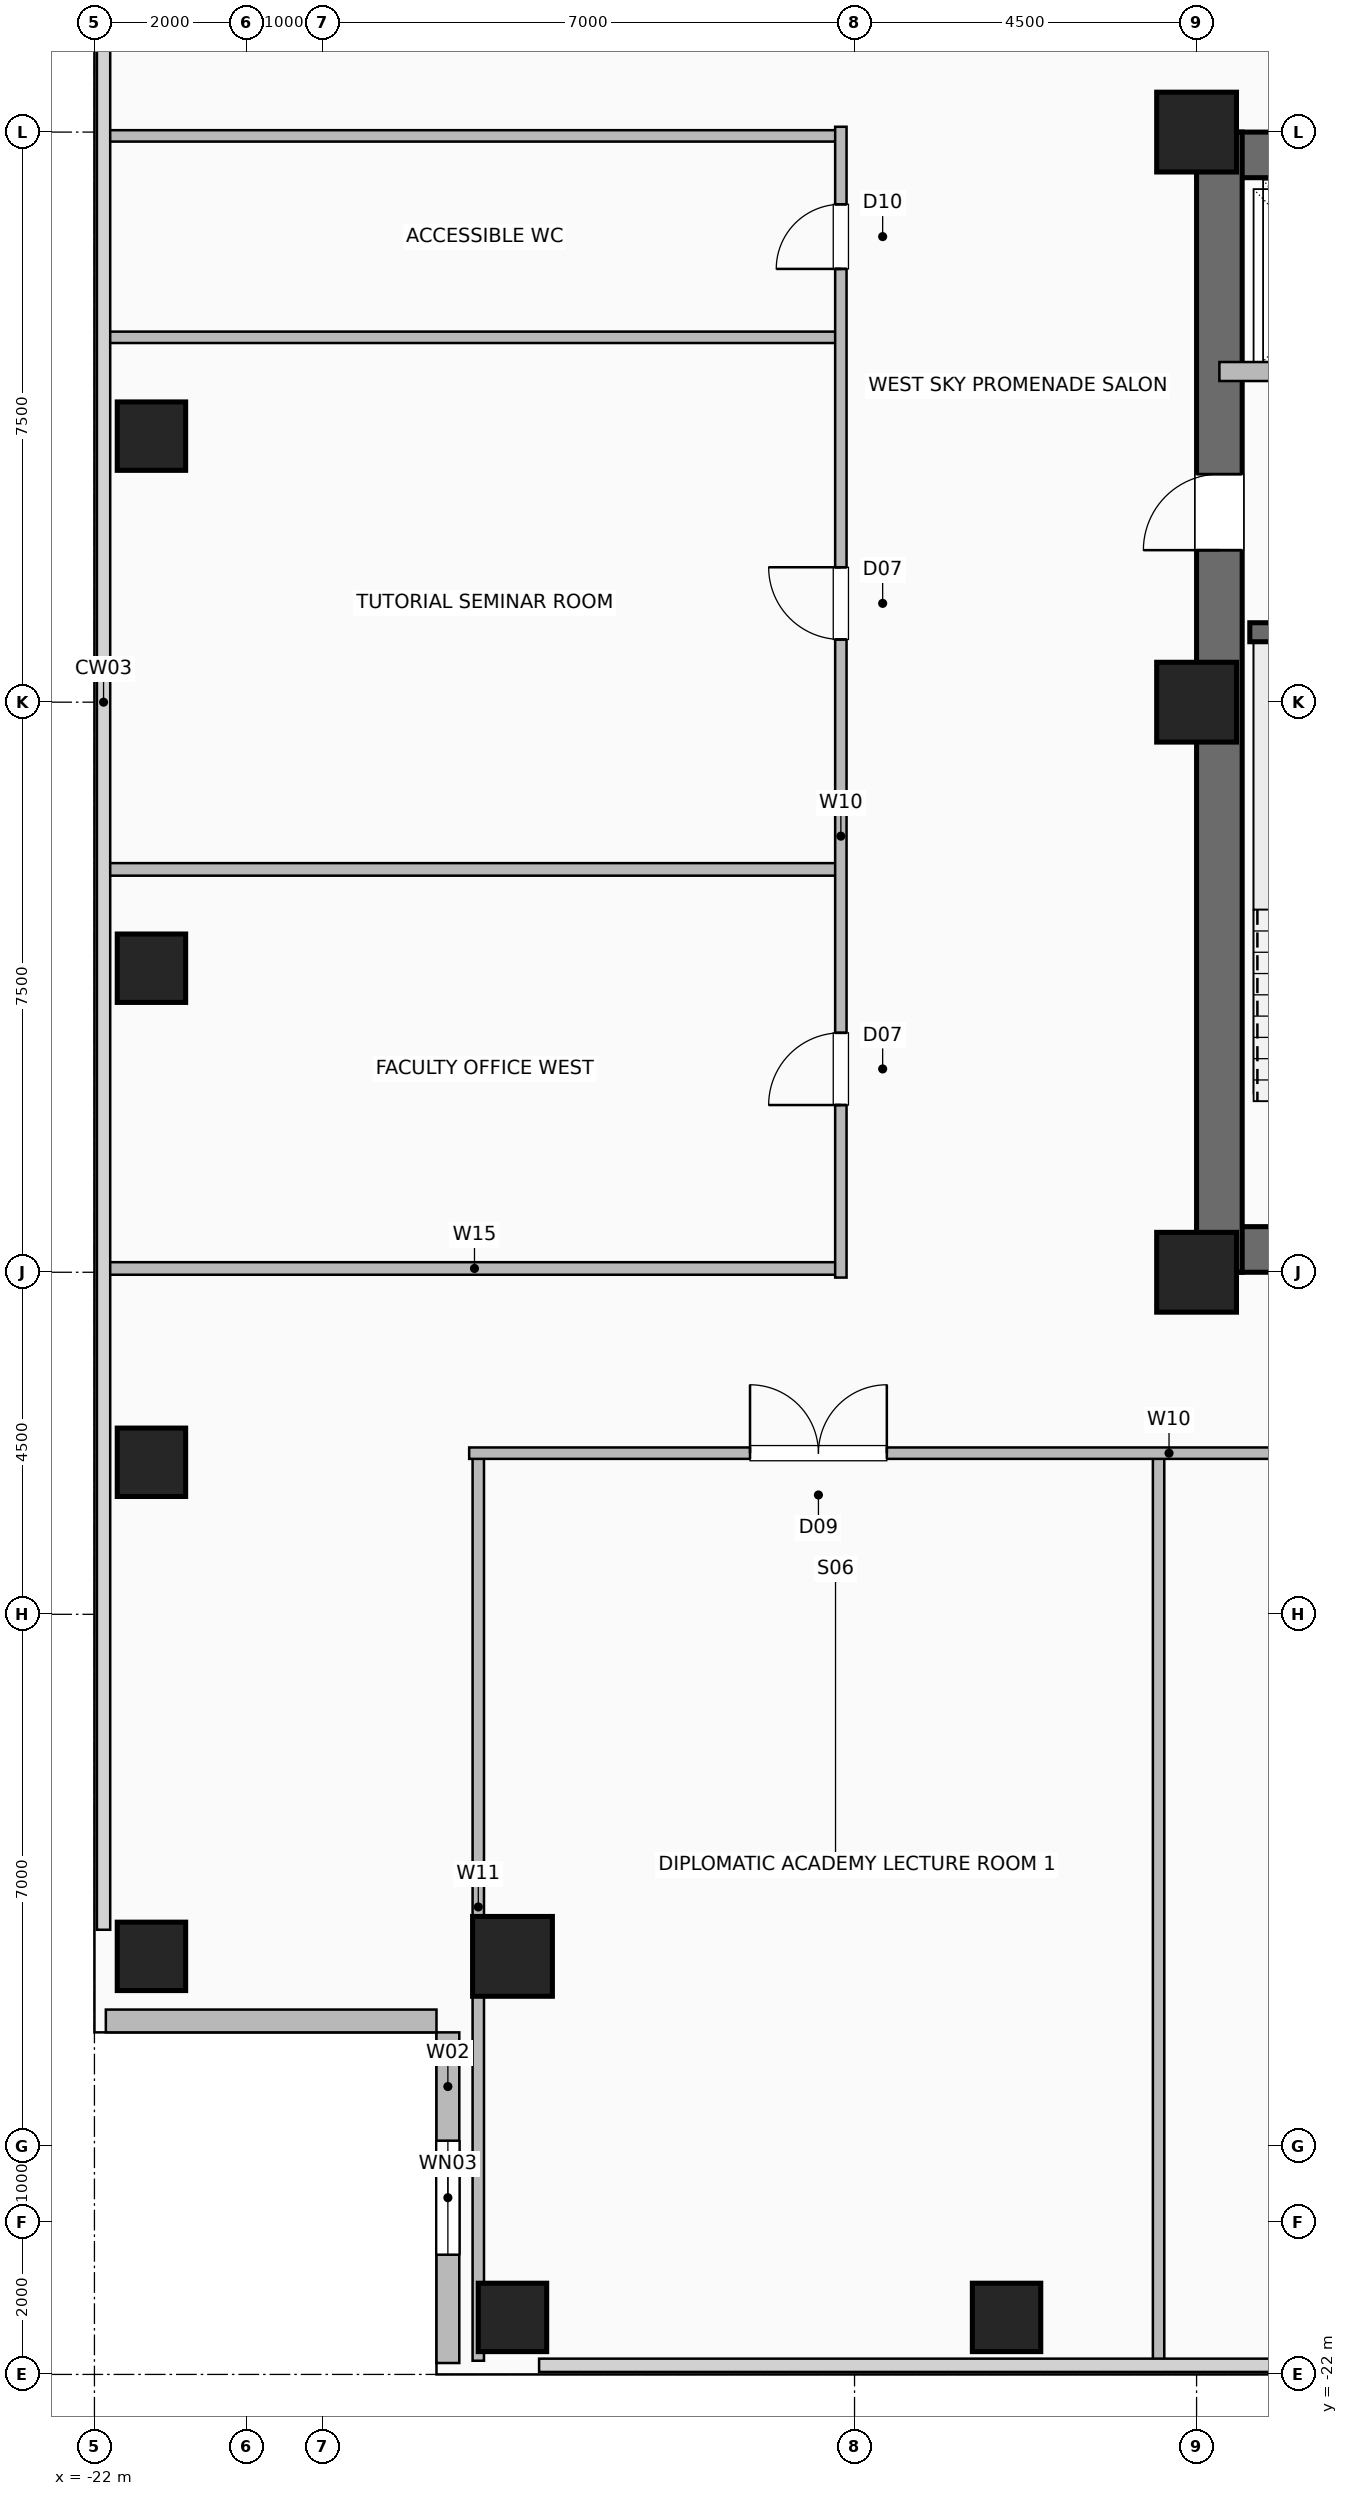
"""IFC4 building model, lengths in metres.
Left out: names, types, materials, properties, quantities, classifications, styles, units other than length and angle.
Written with IfcOpenShell. Run it as: python <this file> out.ifc"""

import sys

from ifc_helpers import new_model, si_unit, direction, frame, frame_2d, origin, origin_2d, place, context, subcontext, project, spatial, rectangle, hollow_rectangle, extrude, element, fill, save


model = new_model("IFC4")
c1 = context("Model", 3, precision=1e-05, world=origin(), true_north=direction((0.0, 1.0)))
c2 = subcontext(c1, "Body", "Model", "MODEL_VIEW")
j1 = project(units=[si_unit("LENGTHUNIT", "METRE"), si_unit("PLANEANGLEUNIT", "RADIAN")], contexts=[c1])
p1 = place(None, origin())
s1 = spatial("IfcSite", under=j1, at=p1, CompositionType="ELEMENT")
p2 = place(p1, origin())
s2 = spatial("IfcBuilding", under=s1, at=p2, CompositionType="ELEMENT")
p3 = place(p2, frame((0.0, 0.0, 130.0)))
s3 = spatial("IfcBuildingStorey", under=s2, at=p3, CompositionType="ELEMENT", Elevation=130.0)
for number, where, z_axis, x_axis in (
    (1, (-7.5, -7.5, 0.0), (0.0, 0.0, 1.0), (1.0, 0.0, 0.0)),
    (2, (-7.5, 7.5, 0.0), (0.0, 0.0, 1.0), (1.0, 0.0, 0.0)),
    (3, (-7.5, 0.0, 0.0), (0.0, 0.0, 1.0), (1.0, 0.0, 0.0)),
):
    element("IfcColumn", number, at=place(p3, frame(where, z_axis=z_axis, x_axis=x_axis)), inside=s3, PredefinedType="COLUMN", context=c2, shape_type="SweptSolid", body=[
        extrude(hollow_rectangle(XDim=1.05, YDim=1.05, WallThickness=0.05, at=origin_2d()), origin(), (0.0, 0.0, 1.0), 3.6),
    ])
for number, where, z_axis, x_axis in (
    (4, (-16.5, -21.25, 0.0), (0.0, 0.0, 1.0), (1.0, 0.0, 0.0)),
    (5, (-21.25, -16.5, 0.0), (0.0, 0.0, 1.0), (1.0, 0.0, 0.0)),
    (6, (-10.0, -21.25, 0.0), (0.0, 0.0, 1.0), (1.0, 0.0, 0.0)),
    (7, (-21.25, -10.0, 0.0), (0.0, 0.0, 1.0), (1.0, 0.0, 0.0)),
    (8, (-21.25, -3.5, 0.0), (0.0, 0.0, 1.0), (1.0, 0.0, 0.0)),
    (9, (-21.25, 3.5, 0.0), (0.0, 0.0, 1.0), (1.0, 0.0, 0.0)),
):
    element("IfcColumn", number, at=place(p3, frame(where, z_axis=z_axis, x_axis=x_axis)), inside=s3, PredefinedType="COLUMN", context=c2, shape_type="SweptSolid", body=[
        extrude(hollow_rectangle(XDim=0.9, YDim=0.9, WallThickness=0.045, at=origin_2d()), origin(), (0.0, 0.0, 1.0), 3.6),
    ])
p4 = place(p3, frame((-16.5, -16.5, 0.0), z_axis=(0.0, 0.0, 1.0), x_axis=(1.0, 0.0, 0.0)))
e10 = element("IfcColumn", 10, at=p4, inside=s3, PredefinedType="COLUMN", context=c2, shape_type="SweptSolid", body=[
    extrude(hollow_rectangle(XDim=1.05, YDim=1.05, WallThickness=0.05, at=origin_2d()), origin(), (0.0, 0.0, 1.0), 3.6),
])
p5 = place(p3, frame((-17.35, -21.85, 0.0), z_axis=(0.0, 0.0, 1.0), x_axis=(0.0, 1.0, 0.0)))
e11 = element("IfcWall", 11, at=p5, inside=s3, PredefinedType="SOLIDWALL", context=c2, shape_type="SweptSolid", body=[
    extrude(rectangle(XDim=4.35, YDim=0.3, at=frame_2d((2.175, 0.0))), origin(), (0.0, 0.0, 1.0), 3.36),
])
p6 = place(p5, frame((1.425, 0.0, 0.9)))
e12 = element("IfcOpeningElement", 12, at=p6, cuts=e11, PredefinedType="OPENING", context=c2, shape_type="SweptSolid", body=[
    extrude(rectangle(XDim=1.5, YDim=1.8, at=frame_2d((0.75, 0.9))), frame((0.0, 0.16, 0.0), z_axis=(0.0, -1.0, 0.0), x_axis=(1.0, 0.0, 0.0)), (0.0, 0.0, 1.0), 0.32),
])
p7 = place(p3, frame((-21.85, -17.35, 0.0), z_axis=(0.0, 0.0, 1.0), x_axis=(1.0, 0.0, 0.0)))
e13 = element("IfcWall", 13, at=p7, inside=s3, PredefinedType="SOLIDWALL", context=c2, shape_type="SweptSolid", body=[
    extrude(rectangle(XDim=4.35, YDim=0.3, at=frame_2d((2.175, 0.0))), origin(), (0.0, 0.0, 1.0), 3.36),
])
p8 = place(p3, frame((-7.5, -7.2, 0.0), z_axis=(0.0, 0.0, 1.0), x_axis=(1.0, 0.0, 0.0)))
e14 = element("IfcWall", 14, at=p8, inside=s3, PredefinedType="SHEAR", context=c2, shape_type="SweptSolid", body=[
    extrude(rectangle(XDim=15.0, YDim=0.6, at=frame_2d((7.5, 0.0))), origin(), (0.0, 0.0, 1.0), 3.36),
])
p9 = place(p8, frame((1.55, 0.0, 0.0)))
e15 = element("IfcOpeningElement", 15, at=p9, cuts=e14, PredefinedType="OPENING", context=c2, shape_type="SweptSolid", body=[
    extrude(rectangle(XDim=1.05, YDim=2.08, at=frame_2d((0.525, 1.04))), frame((0.0, 0.31, 0.0), z_axis=(0.0, -1.0, 0.0), x_axis=(1.0, 0.0, 0.0)), (0.0, 0.0, 1.0), 0.62),
])
p10 = place(p8, frame((12.4, 0.0, 0.0)))
e16 = element("IfcOpeningElement", 16, at=p10, cuts=e14, PredefinedType="OPENING", context=c2, shape_type="SweptSolid", body=[
    extrude(rectangle(XDim=1.05, YDim=2.08, at=frame_2d((0.525, 1.04))), frame((0.0, 0.31, 0.0), z_axis=(0.0, -1.0, 0.0), x_axis=(1.0, 0.0, 0.0)), (0.0, 0.0, 1.0), 0.62),
])
p11 = place(p8, frame((4.95, 0.0, 0.0)))
e17 = element("IfcOpeningElement", 17, at=p11, cuts=e14, PredefinedType="OPENING", context=c2, shape_type="SweptSolid", body=[
    extrude(rectangle(XDim=1.0, YDim=2.08, at=frame_2d((0.5, 1.04))), frame((0.0, 0.31, 0.0), z_axis=(0.0, -1.0, 0.0), x_axis=(1.0, 0.0, 0.0)), (0.0, 0.0, 1.0), 0.62),
])
p12 = place(p8, frame((7.05, 0.0, 0.0)))
e18 = element("IfcOpeningElement", 18, at=p12, cuts=e14, PredefinedType="OPENING", context=c2, shape_type="SweptSolid", body=[
    extrude(rectangle(XDim=1.0, YDim=2.08, at=frame_2d((0.5, 1.04))), frame((0.0, 0.31, 0.0), z_axis=(0.0, -1.0, 0.0), x_axis=(1.0, 0.0, 0.0)), (0.0, 0.0, 1.0), 0.62),
])
p13 = place(p8, frame((9.15, 0.0, 0.0)))
e19 = element("IfcOpeningElement", 19, at=p13, cuts=e14, PredefinedType="OPENING", context=c2, shape_type="SweptSolid", body=[
    extrude(rectangle(XDim=1.0, YDim=2.08, at=frame_2d((0.5, 1.04))), frame((0.0, 0.31, 0.0), z_axis=(0.0, -1.0, 0.0), x_axis=(1.0, 0.0, 0.0)), (0.0, 0.0, 1.0), 0.62),
])
p14 = place(p3, frame((-7.5, 7.2, 0.0), z_axis=(0.0, 0.0, 1.0), x_axis=(1.0, 0.0, 0.0)))
e20 = element("IfcWall", 20, at=p14, inside=s3, PredefinedType="SHEAR", context=c2, shape_type="SweptSolid", body=[
    extrude(rectangle(XDim=15.0, YDim=0.6, at=frame_2d((7.5, 0.0))), origin(), (0.0, 0.0, 1.0), 3.36),
])
p15 = place(p3, frame((-7.2, -7.5, 0.0), z_axis=(0.0, 0.0, 1.0), x_axis=(0.0, 1.0, 0.0)))
e21 = element("IfcWall", 21, at=p15, inside=s3, PredefinedType="SHEAR", context=c2, shape_type="SweptSolid", body=[
    extrude(rectangle(XDim=15.0, YDim=0.6, at=frame_2d((7.5, 0.0))), origin(), (0.0, 0.0, 1.0), 3.36),
])
p16 = place(p15, frame((9.5, 0.0, 0.0)))
e22 = element("IfcOpeningElement", 22, at=p16, cuts=e21, PredefinedType="OPENING", context=c2, shape_type="SweptSolid", body=[
    extrude(rectangle(XDim=1.0, YDim=2.08, at=frame_2d((0.5, 1.04))), frame((0.0, 0.31, 0.0), z_axis=(0.0, -1.0, 0.0), x_axis=(1.0, 0.0, 0.0)), (0.0, 0.0, 1.0), 0.62),
])
p17 = place(p3, frame((-6.8, 0.92, 0.0), z_axis=(0.0, 0.0, 1.0), x_axis=(1.0, 0.0, 0.0)))
e23 = element("IfcWall", 23, at=p17, inside=s3, PredefinedType="SHEAR", context=c2, shape_type="SweptSolid", body=[
    extrude(rectangle(XDim=3.33, YDim=0.25, at=frame_2d((1.665, 0.0))), origin(), (0.0, 0.0, 1.0), 3.36),
])
p18 = place(p3, frame((-7.2, 4.35, 0.0), z_axis=(0.0, 0.0, 1.0), x_axis=(1.0, 0.0, 0.0)))
e24 = element("IfcWall", 24, at=p18, inside=s3, PredefinedType="SHEAR", context=c2, shape_type="SweptSolid", body=[
    extrude(rectangle(XDim=2.7, YDim=0.25, at=frame_2d((1.35, 0.0))), origin(), (0.0, 0.0, 1.0), 3.36),
])
p19 = place(p18, frame((0.75, 0.0, 0.0)))
e25 = element("IfcOpeningElement", 25, at=p19, cuts=e24, PredefinedType="OPENING", context=c2, shape_type="SweptSolid", body=[
    extrude(rectangle(XDim=1.2, YDim=2.2, at=frame_2d((0.6, 1.1))), frame((0.0, 0.135, 0.0), z_axis=(0.0, -1.0, 0.0), x_axis=(1.0, 0.0, 0.0)), (0.0, 0.0, 1.0), 0.27),
])
for number, where, z_axis, x_axis in (
    (26, (-16.95, -21.82, 0.0), (0.0, 0.0, 1.0), (0.0, 1.0, 0.0)),
    (27, (-8.0, -21.82, 0.0), (0.0, 0.0, 1.0), (0.0, 1.0, 0.0)),
):
    element("IfcWall", number, at=place(p3, frame(where, z_axis=z_axis, x_axis=x_axis)), inside=s3, PredefinedType="PARTITIONING", context=c2, shape_type="SweptSolid", body=[
        extrude(rectangle(XDim=11.94, YDim=0.15, at=frame_2d((5.97, 0.0))), origin(), (0.0, 0.0, 1.0), 3.36),
    ])
p20 = place(p3, frame((-17.07, -9.88, 0.0), z_axis=(0.0, 0.0, 1.0), x_axis=(1.0, 0.0, 0.0)))
e28 = element("IfcWall", 28, at=p20, inside=s3, PredefinedType="PARTITIONING", context=c2, shape_type="SweptSolid", body=[
    extrude(rectangle(XDim=34.14, YDim=0.15, at=frame_2d((17.07, 0.0))), origin(), (0.0, 0.0, 1.0), 3.36),
])
p21 = place(p20, frame((3.695, 0.0, 0.0)))
e29 = element("IfcOpeningElement", 29, at=p21, cuts=e28, PredefinedType="OPENING", context=c2, shape_type="SweptSolid", body=[
    extrude(rectangle(XDim=1.8, YDim=2.08, at=frame_2d((0.9, 1.04))), frame((0.0, 0.085, 0.0), z_axis=(0.0, -1.0, 0.0), x_axis=(1.0, 0.0, 0.0)), (0.0, 0.0, 1.0), 0.17),
])
p22 = place(p20, frame((12.92, 0.0, 0.0)))
e30 = element("IfcOpeningElement", 30, at=p22, cuts=e28, PredefinedType="OPENING", context=c2, shape_type="SweptSolid", body=[
    extrude(rectangle(XDim=1.8, YDim=2.08, at=frame_2d((0.9, 1.04))), frame((0.0, 0.085, 0.0), z_axis=(0.0, -1.0, 0.0), x_axis=(1.0, 0.0, 0.0)), (0.0, 0.0, 1.0), 0.17),
])
p23 = place(p20, frame((21.67, 0.0, 0.0)))
e31 = element("IfcOpeningElement", 31, at=p23, cuts=e28, PredefinedType="OPENING", context=c2, shape_type="SweptSolid", body=[
    extrude(rectangle(XDim=1.8, YDim=2.08, at=frame_2d((0.9, 1.04))), frame((0.0, 0.085, 0.0), z_axis=(0.0, -1.0, 0.0), x_axis=(1.0, 0.0, 0.0)), (0.0, 0.0, 1.0), 0.17),
])
p24 = place(p20, frame((29.82, 0.0, 0.0)))
e32 = element("IfcOpeningElement", 32, at=p24, cuts=e28, PredefinedType="OPENING", context=c2, shape_type="SweptSolid", body=[
    extrude(rectangle(XDim=0.95, YDim=2.06, at=frame_2d((0.475, 1.03))), frame((0.0, 0.085, 0.0), z_axis=(0.0, -1.0, 0.0), x_axis=(1.0, 0.0, 0.0)), (0.0, 0.0, 1.0), 0.17),
])
for number, where, z_axis, x_axis in (
    (33, (-21.82, -7.45, 0.0), (0.0, 0.0, 1.0), (1.0, 0.0, 0.0)),
    (34, (-21.82, -2.2, 0.0), (0.0, 0.0, 1.0), (1.0, 0.0, 0.0)),
):
    element("IfcWall", number, at=place(p3, frame(where, z_axis=z_axis, x_axis=x_axis)), inside=s3, PredefinedType="PLUMBINGWALL", context=c2, shape_type="SweptSolid", body=[
        extrude(rectangle(XDim=9.64, YDim=0.165, at=frame_2d((4.82, 0.0))), origin(), (0.0, 0.0, 1.0), 3.36),
    ])
p25 = place(p3, frame((-21.82, 4.8, 0.0), z_axis=(0.0, 0.0, 1.0), x_axis=(1.0, 0.0, 0.0)))
e35 = element("IfcWall", 35, at=p25, inside=s3, PredefinedType="PARTITIONING", context=c2, shape_type="SweptSolid", body=[
    extrude(rectangle(XDim=9.64, YDim=0.15, at=frame_2d((4.82, 0.0))), origin(), (0.0, 0.0, 1.0), 2.928),
])
p26 = place(p3, frame((-21.82, 7.45, 0.0), z_axis=(0.0, 0.0, 1.0), x_axis=(1.0, 0.0, 0.0)))
e36 = element("IfcWall", 36, at=p26, inside=s3, PredefinedType="PARTITIONING", context=c2, shape_type="SweptSolid", body=[
    extrude(rectangle(XDim=9.64, YDim=0.15, at=frame_2d((4.82, 0.0))), origin(), (0.0, 0.0, 1.0), 3.36),
])
p27 = place(p3, frame((-12.18, -7.57, 0.0), z_axis=(0.0, 0.0, 1.0), x_axis=(0.0, 1.0, 0.0)))
e37 = element("IfcWall", 37, at=p27, inside=s3, PredefinedType="PARTITIONING", context=c2, shape_type="SweptSolid", body=[
    extrude(rectangle(XDim=15.14, YDim=0.15, at=frame_2d((7.57, 0.0))), origin(), (0.0, 0.0, 1.0), 3.36),
])
p28 = place(p27, frame((2.27, 0.0, 0.0)))
e38 = element("IfcOpeningElement", 38, at=p28, cuts=e37, PredefinedType="OPENING", context=c2, shape_type="SweptSolid", body=[
    extrude(rectangle(XDim=0.95, YDim=2.06, at=frame_2d((0.475, 1.03))), frame((0.0, 0.085, 0.0), z_axis=(0.0, -1.0, 0.0), x_axis=(1.0, 0.0, 0.0)), (0.0, 0.0, 1.0), 0.17),
])
p29 = place(p27, frame((8.395, 0.0, 0.0)))
e39 = element("IfcOpeningElement", 39, at=p29, cuts=e37, PredefinedType="OPENING", context=c2, shape_type="SweptSolid", body=[
    extrude(rectangle(XDim=0.95, YDim=2.06, at=frame_2d((0.475, 1.03))), frame((0.0, 0.085, 0.0), z_axis=(0.0, -1.0, 0.0), x_axis=(1.0, 0.0, 0.0)), (0.0, 0.0, 1.0), 0.17),
])
p30 = place(p27, frame((13.27, 0.0, 0.0)))
e40 = element("IfcOpeningElement", 40, at=p30, cuts=e37, PredefinedType="OPENING", context=c2, shape_type="SweptSolid", body=[
    extrude(rectangle(XDim=0.85, YDim=2.05, at=frame_2d((0.425, 1.025))), frame((0.0, 0.085, 0.0), z_axis=(0.0, -1.0, 0.0), x_axis=(1.0, 0.0, 0.0)), (0.0, 0.0, 1.0), 0.17),
])
p31 = place(p6, origin())
e41 = element("IfcWindow", 41, at=p31, inside=s3, PartitioningType="SINGLE_PANEL", PredefinedType="WINDOW", context=c2, shape_type="SweptSolid", body=[
    extrude(rectangle(XDim=1.5, YDim=1.8, at=frame_2d((0.75, 0.9))), frame((0.0, 0.03, 0.0), z_axis=(0.0, -1.0, 0.0), x_axis=(1.0, 0.0, 0.0)), (0.0, 0.0, 1.0), 0.06),
])
fill(e12, e41)
p32 = place(p16, origin())
e42 = element("IfcDoor", 42, at=p32, inside=s3, OperationType="SINGLE_SWING_LEFT", PredefinedType="DOOR", context=c2, shape_type="SweptSolid", body=[
    extrude(rectangle(XDim=1.0, YDim=2.08, at=frame_2d((0.5, 1.04))), frame((0.0, 0.025, 0.0), z_axis=(0.0, -1.0, 0.0), x_axis=(1.0, 0.0, 0.0)), (0.0, 0.0, 1.0), 0.05),
])
fill(e22, e42)
p33 = place(p21, origin())
e43 = element("IfcDoor", 43, at=p33, inside=s3, OperationType="DOUBLE_DOOR_SINGLE_SWING", PredefinedType="DOOR", context=c2, shape_type="SweptSolid", body=[
    extrude(rectangle(XDim=1.8, YDim=2.08, at=frame_2d((0.9, 1.04))), frame((0.0, 0.025, 0.0), z_axis=(0.0, -1.0, 0.0), x_axis=(1.0, 0.0, 0.0)), (0.0, 0.0, 1.0), 0.05),
])
fill(e29, e43)
p34 = place(p28, origin())
e44 = element("IfcDoor", 44, at=p34, inside=s3, OperationType="SINGLE_SWING_LEFT", PredefinedType="DOOR", context=c2, shape_type="SweptSolid", body=[
    extrude(rectangle(XDim=0.95, YDim=2.06, at=frame_2d((0.475, 1.03))), frame((0.0, 0.025, 0.0), z_axis=(0.0, -1.0, 0.0), x_axis=(1.0, 0.0, 0.0)), (0.0, 0.0, 1.0), 0.05),
])
fill(e38, e44)
p35 = place(p29, origin())
e45 = element("IfcDoor", 45, at=p35, inside=s3, OperationType="SINGLE_SWING_RIGHT", PredefinedType="DOOR", context=c2, shape_type="SweptSolid", body=[
    extrude(rectangle(XDim=0.95, YDim=2.06, at=frame_2d((0.475, 1.03))), frame((0.0, 0.025, 0.0), z_axis=(0.0, -1.0, 0.0), x_axis=(1.0, 0.0, 0.0)), (0.0, 0.0, 1.0), 0.05),
])
fill(e39, e45)
p36 = place(p30, origin())
e46 = element("IfcDoor", 46, at=p36, inside=s3, OperationType="SINGLE_SWING_LEFT", PredefinedType="DOOR", context=c2, shape_type="SweptSolid", body=[
    extrude(rectangle(XDim=0.85, YDim=2.05, at=frame_2d((0.425, 1.025))), frame((0.0, 0.025, 0.0), z_axis=(0.0, -1.0, 0.0), x_axis=(1.0, 0.0, 0.0)), (0.0, 0.0, 1.0), 0.05),
])
fill(e40, e46)
save(model, sys.argv[1])
